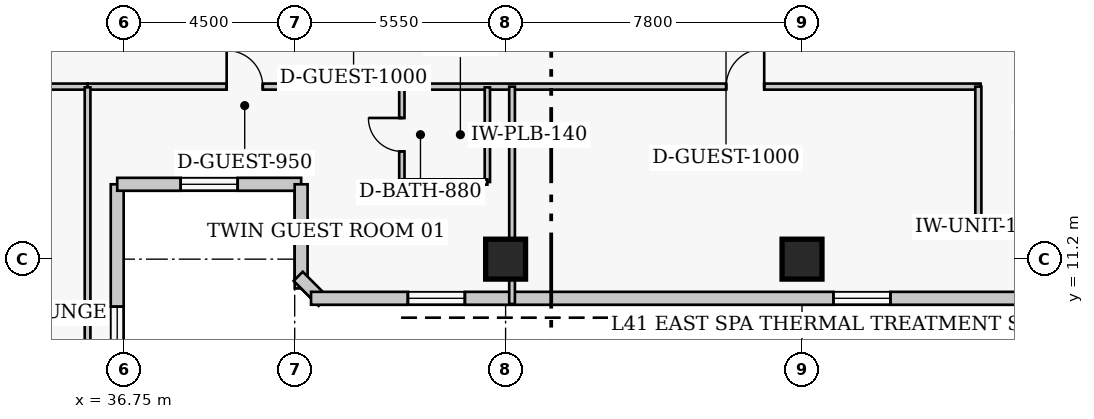
"""IFC4 building model, lengths in metres.
Left out: names, types, materials, properties, quantities, classifications, styles, units other than length and angle.
Written with IfcOpenShell. Run it as: python <this file> out.ifc"""

import sys

from ifc_helpers import new_model, si_unit, direction, frame, frame_2d, origin, origin_2d, place, context, subcontext, project, spatial, rectangle, extrude, element, fill, save


model = new_model("IFC4")
c1 = context("Model", 3, precision=1e-05, world=origin(), true_north=direction((0.0, 1.0)))
c2 = subcontext(c1, "Body", "Model", "MODEL_VIEW")
j1 = project(units=[si_unit("LENGTHUNIT", "METRE"), si_unit("PLANEANGLEUNIT", "RADIAN")], contexts=[c1])
p1 = place(None, origin())
s1 = spatial("IfcSite", under=j1, at=p1, CompositionType="ELEMENT")
p2 = place(p1, origin())
s2 = spatial("IfcBuilding", under=s1, at=p2, CompositionType="ELEMENT")
p3 = place(p2, frame((0.0, 0.0, 165.0)))
s3 = spatial("IfcBuildingStorey", under=s2, at=p3, CompositionType="ELEMENT", Elevation=165.0)
for number, where, z_axis, x_axis in (
    (1, (46.8, 11.2, 0.0), (0.0, 0.0, 1.0), (1.0, 0.0, 0.0)),
    (2, (54.6, 11.2, 0.0), (0.0, 0.0, 1.0), (1.0, 0.0, 0.0)),
):
    element("IfcColumn", number, at=place(p3, frame(where, z_axis=z_axis, x_axis=x_axis)), inside=s3, PredefinedType="COLUMN", context=c2, shape_type="SweptSolid", body=[
        extrude(rectangle(XDim=1.05, YDim=1.05, at=origin_2d()), origin(), (0.0, 0.0, 1.0), 3.8),
    ])
p4 = place(p3, frame((36.58, 5.23, 0.0), z_axis=(0.0, 0.0, 1.0), x_axis=(0.0, 1.0, 0.0)))
e3 = element("IfcWall", 3, at=p4, inside=s3, PredefinedType="SOLIDWALL", context=c2, shape_type="SweptSolid", body=[
    extrude(rectangle(XDim=7.94, YDim=0.34, at=frame_2d((3.97, 0.0))), origin(), (0.0, 0.0, 1.0), 3.55),
])
p5 = place(p4, frame((3.22, 0.0, 0.85)))
e4 = element("IfcOpeningElement", 4, at=p5, cuts=e3, PredefinedType="OPENING", context=c2, shape_type="SweptSolid", body=[
    extrude(rectangle(XDim=1.5, YDim=1.75, at=frame_2d((0.75, 0.875))), frame((0.0, 0.18, 0.0), z_axis=(0.0, -1.0, 0.0), x_axis=(1.0, 0.0, 0.0)), (0.0, 0.0, 1.0), 0.36),
])
p6 = place(p3, frame((36.58, 13.17, 0.0), z_axis=(0.0, 0.0, 1.0), x_axis=(1.0, 0.0, 0.0)))
e5 = element("IfcWall", 5, at=p6, inside=s3, PredefinedType="SOLIDWALL", context=c2, shape_type="SweptSolid", body=[
    extrude(rectangle(XDim=4.84, YDim=0.34, at=frame_2d((2.42, 0.0))), origin(), (0.0, 0.0, 1.0), 3.55),
])
p7 = place(p6, frame((1.67, 0.0, 0.85)))
e6 = element("IfcOpeningElement", 6, at=p7, cuts=e5, PredefinedType="OPENING", context=c2, shape_type="SweptSolid", body=[
    extrude(rectangle(XDim=1.5, YDim=1.75, at=frame_2d((0.75, 0.875))), frame((0.0, 0.18, 0.0), z_axis=(0.0, -1.0, 0.0), x_axis=(1.0, 0.0, 0.0)), (0.0, 0.0, 1.0), 0.36),
])
p8 = place(p3, frame((41.42, 13.17, 0.0), z_axis=(0.0, 0.0, 1.0), x_axis=(0.0, -1.0, 0.0)))
e7 = element("IfcWall", 7, at=p8, inside=s3, PredefinedType="SOLIDWALL", context=c2, shape_type="SweptSolid", body=[
    extrude(rectangle(XDim=2.74, YDim=0.34, at=frame_2d((1.37, 0.0))), origin(), (0.0, 0.0, 1.0), 3.55),
])
p9 = place(p3, frame((41.342, 10.749, 0.0), z_axis=(0.0, 0.0, 1.0), x_axis=(0.707106781187, -0.707106781187, 0.0)))
e8 = element("IfcWall", 8, at=p9, inside=s3, PredefinedType="SOLIDWALL", context=c2, shape_type="SweptSolid", body=[
    extrude(rectangle(XDim=0.929, YDim=0.34, at=frame_2d((0.464, 0.0))), origin(), (0.0, 0.0, 1.0), 3.55),
])
p10 = place(p3, frame((41.68, 10.17, 0.0), z_axis=(0.0, 0.0, 1.0), x_axis=(1.0, 0.0, 0.0)))
e9 = element("IfcWall", 9, at=p10, inside=s3, PredefinedType="SOLIDWALL", context=c2, shape_type="SweptSolid", body=[
    extrude(rectangle(XDim=26.69, YDim=0.34, at=frame_2d((13.345, 0.0))), origin(), (0.0, 0.0, 1.0), 3.55),
])
p11 = place(p10, frame((2.548, 0.0, 0.85)))
e10 = element("IfcOpeningElement", 10, at=p11, cuts=e9, PredefinedType="OPENING", context=c2, shape_type="SweptSolid", body=[
    extrude(rectangle(XDim=1.5, YDim=1.75, at=frame_2d((0.75, 0.875))), frame((0.0, 0.18, 0.0), z_axis=(0.0, -1.0, 0.0), x_axis=(1.0, 0.0, 0.0)), (0.0, 0.0, 1.0), 0.36),
])
p12 = place(p10, frame((13.745, 0.0, 0.85)))
e11 = element("IfcOpeningElement", 11, at=p12, cuts=e9, PredefinedType="OPENING", context=c2, shape_type="SweptSolid", body=[
    extrude(rectangle(XDim=1.5, YDim=1.75, at=frame_2d((0.75, 0.875))), frame((0.0, 0.18, 0.0), z_axis=(0.0, -1.0, 0.0), x_axis=(1.0, 0.0, 0.0)), (0.0, 0.0, 1.0), 0.36),
])
p13 = place(p10, frame((21.492, 0.0, 0.85)))
e12 = element("IfcOpeningElement", 12, at=p13, cuts=e9, PredefinedType="OPENING", context=c2, shape_type="SweptSolid", body=[
    extrude(rectangle(XDim=1.5, YDim=1.75, at=frame_2d((0.75, 0.875))), frame((0.0, 0.18, 0.0), z_axis=(0.0, -1.0, 0.0), x_axis=(1.0, 0.0, 0.0)), (0.0, 0.0, 1.0), 0.36),
])
p14 = place(p3, frame((18.8, 15.74, 0.0), z_axis=(0.0, 0.0, 1.0), x_axis=(1.0, 0.0, 0.0)))
e13 = element("IfcWall", 13, at=p14, inside=s3, PredefinedType="PARTITIONING", context=c2, shape_type="SweptSolid", body=[
    extrude(rectangle(XDim=17.0, YDim=0.16, at=frame_2d((8.5, 0.0))), origin(), (0.0, 0.0, 1.0), 3.55),
])
p15 = place(p14, frame((8.03, 0.0, 0.0)))
e14 = element("IfcOpeningElement", 14, at=p15, cuts=e13, PredefinedType="OPENING", context=c2, shape_type="SweptSolid", body=[
    extrude(rectangle(XDim=1.0, YDim=2.15, at=frame_2d((0.5, 1.075))), frame((0.0, 0.09, 0.0), z_axis=(0.0, -1.0, 0.0), x_axis=(1.0, 0.0, 0.0)), (0.0, 0.0, 1.0), 0.18),
])
p16 = place(p3, frame((35.8, 15.74, 0.0), z_axis=(0.0, 0.0, 1.0), x_axis=(1.0, 0.0, 0.0)))
e15 = element("IfcWall", 15, at=p16, inside=s3, PredefinedType="PARTITIONING", context=c2, shape_type="SweptSolid", body=[
    extrude(rectangle(XDim=23.5, YDim=0.16, at=frame_2d((11.75, 0.0))), origin(), (0.0, 0.0, 1.0), 3.55),
])
p17 = place(p16, frame((3.66, 0.0, 0.0)))
e16 = element("IfcOpeningElement", 16, at=p17, cuts=e15, PredefinedType="OPENING", context=c2, shape_type="SweptSolid", body=[
    extrude(rectangle(XDim=0.95, YDim=2.1, at=frame_2d((0.475, 1.05))), frame((0.0, 0.09, 0.0), z_axis=(0.0, -1.0, 0.0), x_axis=(1.0, 0.0, 0.0)), (0.0, 0.0, 1.0), 0.18),
])
p18 = place(p16, frame((16.805, 0.0, 0.0)))
e17 = element("IfcOpeningElement", 17, at=p18, cuts=e15, PredefinedType="OPENING", context=c2, shape_type="SweptSolid", body=[
    extrude(rectangle(XDim=1.0, YDim=2.15, at=frame_2d((0.5, 1.075))), frame((0.0, 0.09, 0.0), z_axis=(0.0, -1.0, 0.0), x_axis=(1.0, 0.0, 0.0)), (0.0, 0.0, 1.0), 0.18),
])
p19 = place(p3, frame((59.24, 12.05, 0.0), z_axis=(0.0, 0.0, 1.0), x_axis=(0.0, 1.0, 0.0)))
e18 = element("IfcWall", 18, at=p19, inside=s3, PredefinedType="PARTITIONING", context=c2, shape_type="SweptSolid", body=[
    extrude(rectangle(XDim=3.69, YDim=0.16, at=frame_2d((1.845, 0.0))), origin(), (0.0, 0.0, 1.0), 3.55),
])
p20 = place(p3, frame((59.24, 12.05, 0.0), z_axis=(0.0, 0.0, 1.0), x_axis=(1.0, 0.0, 0.0)))
e19 = element("IfcWall", 19, at=p20, inside=s3, PredefinedType="PARTITIONING", context=c2, shape_type="SweptSolid", body=[
    extrude(rectangle(XDim=2.22, YDim=0.15, at=frame_2d((1.11, 0.0))), origin(), (0.0, 0.0, 1.0), 3.55),
])
p21 = place(p3, frame((35.8, 4.82, 0.0), z_axis=(0.0, 0.0, 1.0), x_axis=(0.0, 1.0, 0.0)))
e20 = element("IfcWall", 20, at=p21, inside=s3, PredefinedType="PARTITIONING", context=c2, shape_type="SweptSolid", body=[
    extrude(rectangle(XDim=10.9, YDim=0.15, at=frame_2d((5.45, 0.0))), origin(), (0.0, 0.0, 1.0), 3.55),
])
p22 = place(p3, frame((44.07, 13.23, 0.0), z_axis=(0.0, 0.0, 1.0), x_axis=(0.0, 1.0, 0.0)))
e21 = element("IfcWall", 21, at=p22, inside=s3, PredefinedType="PLUMBINGWALL", context=c2, shape_type="SweptSolid", body=[
    extrude(rectangle(XDim=2.49, YDim=0.14, at=frame_2d((1.245, 0.0))), origin(), (0.0, 0.0, 1.0), 3.55),
])
p23 = place(p22, frame((0.805, 0.0, 0.0)))
e22 = element("IfcOpeningElement", 22, at=p23, cuts=e21, PredefinedType="OPENING", context=c2, shape_type="SweptSolid", body=[
    extrude(rectangle(XDim=0.88, YDim=2.05, at=frame_2d((0.44, 1.025))), frame((0.0, 0.08, 0.0), z_axis=(0.0, -1.0, 0.0), x_axis=(1.0, 0.0, 0.0)), (0.0, 0.0, 1.0), 0.16),
])
p24 = place(p3, frame((46.32, 13.23, 0.0), z_axis=(0.0, 0.0, 1.0), x_axis=(0.0, 1.0, 0.0)))
e23 = element("IfcWall", 23, at=p24, inside=s3, PredefinedType="PLUMBINGWALL", context=c2, shape_type="SweptSolid", body=[
    extrude(rectangle(XDim=2.49, YDim=0.14, at=frame_2d((1.245, 0.0))), origin(), (0.0, 0.0, 1.0), 3.55),
])
p25 = place(p3, frame((44.07, 13.23, 0.0), z_axis=(0.0, 0.0, 1.0), x_axis=(1.0, 0.0, 0.0)))
e24 = element("IfcWall", 24, at=p25, inside=s3, PredefinedType="PLUMBINGWALL", context=c2, shape_type="SweptSolid", body=[
    extrude(rectangle(XDim=2.25, YDim=0.14, at=frame_2d((1.125, 0.0))), origin(), (0.0, 0.0, 1.0), 3.55),
])
p26 = place(p3, frame((46.97, 10.02, 0.0), z_axis=(0.0, 0.0, 1.0), x_axis=(0.0, 1.0, 0.0)))
e25 = element("IfcWall", 25, at=p26, inside=s3, PredefinedType="PARTITIONING", context=c2, shape_type="SweptSolid", body=[
    extrude(rectangle(XDim=5.72, YDim=0.15, at=frame_2d((2.86, 0.0))), origin(), (0.0, 0.0, 1.0), 2.9),
])
p27 = place(p5, origin())
e26 = element("IfcWindow", 26, at=p27, inside=s3, PartitioningType="SINGLE_PANEL", PredefinedType="WINDOW", context=c2, shape_type="SweptSolid", body=[
    extrude(rectangle(XDim=1.5, YDim=1.75, at=frame_2d((0.75, 0.875))), frame((0.0, 0.03, 0.0), z_axis=(0.0, -1.0, 0.0), x_axis=(1.0, 0.0, 0.0)), (0.0, 0.0, 1.0), 0.06),
])
fill(e4, e26)
p28 = place(p7, origin())
e27 = element("IfcWindow", 27, at=p28, inside=s3, PartitioningType="SINGLE_PANEL", PredefinedType="WINDOW", context=c2, shape_type="SweptSolid", body=[
    extrude(rectangle(XDim=1.5, YDim=1.75, at=frame_2d((0.75, 0.875))), frame((0.0, 0.03, 0.0), z_axis=(0.0, -1.0, 0.0), x_axis=(1.0, 0.0, 0.0)), (0.0, 0.0, 1.0), 0.06),
])
fill(e6, e27)
p29 = place(p11, origin())
e28 = element("IfcWindow", 28, at=p29, inside=s3, PartitioningType="SINGLE_PANEL", PredefinedType="WINDOW", context=c2, shape_type="SweptSolid", body=[
    extrude(rectangle(XDim=1.5, YDim=1.75, at=frame_2d((0.75, 0.875))), frame((0.0, 0.03, 0.0), z_axis=(0.0, -1.0, 0.0), x_axis=(1.0, 0.0, 0.0)), (0.0, 0.0, 1.0), 0.06),
])
fill(e10, e28)
p30 = place(p12, origin())
e29 = element("IfcWindow", 29, at=p30, inside=s3, PartitioningType="SINGLE_PANEL", PredefinedType="WINDOW", context=c2, shape_type="SweptSolid", body=[
    extrude(rectangle(XDim=1.5, YDim=1.75, at=frame_2d((0.75, 0.875))), frame((0.0, 0.03, 0.0), z_axis=(0.0, -1.0, 0.0), x_axis=(1.0, 0.0, 0.0)), (0.0, 0.0, 1.0), 0.06),
])
fill(e11, e29)
p31 = place(p23, origin())
e30 = element("IfcDoor", 30, at=p31, inside=s3, OperationType="SINGLE_SWING_RIGHT", PredefinedType="DOOR", context=c2, shape_type="SweptSolid", body=[
    extrude(rectangle(XDim=0.88, YDim=2.05, at=frame_2d((0.44, 1.025))), frame((0.0, 0.025, 0.0), z_axis=(0.0, -1.0, 0.0), x_axis=(1.0, 0.0, 0.0)), (0.0, 0.0, 1.0), 0.05),
])
fill(e22, e30)
p32 = place(p17, origin())
e31 = element("IfcDoor", 31, at=p32, inside=s3, OperationType="SINGLE_SWING_LEFT", PredefinedType="DOOR", context=c2, shape_type="SweptSolid", body=[
    extrude(rectangle(XDim=0.95, YDim=2.1, at=frame_2d((0.475, 1.05))), frame((0.0, 0.025, 0.0), z_axis=(0.0, -1.0, 0.0), x_axis=(1.0, 0.0, 0.0)), (0.0, 0.0, 1.0), 0.05),
])
fill(e16, e31)
p33 = place(p18, origin())
e32 = element("IfcDoor", 32, at=p33, inside=s3, OperationType="SINGLE_SWING_RIGHT", PredefinedType="DOOR", context=c2, shape_type="SweptSolid", body=[
    extrude(rectangle(XDim=1.0, YDim=2.15, at=frame_2d((0.5, 1.075))), frame((0.0, 0.025, 0.0), z_axis=(0.0, -1.0, 0.0), x_axis=(1.0, 0.0, 0.0)), (0.0, 0.0, 1.0), 0.05),
])
fill(e17, e32)
save(model, sys.argv[1])
